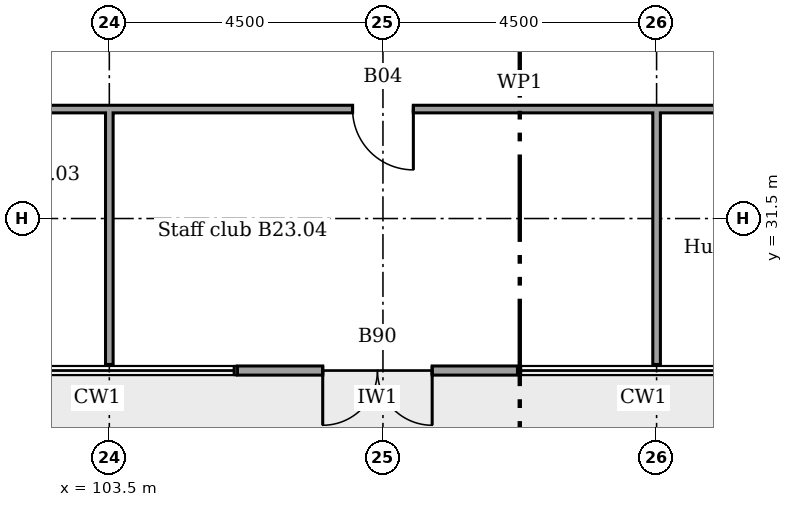
"""IFC4 building model, lengths in metres.
Left out: names, types, materials, properties, quantities, classifications, styles, units other than length and angle.
Written with IfcOpenShell. Run it as: python <this file> out.ifc"""

import sys

from ifc_helpers import new_model, si_unit, direction, frame, frame_2d, origin, place, context, subcontext, project, spatial, rectangle, extrude, element, fill, save


model = new_model("IFC4")
c1 = context("Model", 3, precision=1e-05, world=origin(), true_north=direction((0.0, 1.0)))
c2 = subcontext(c1, "Body", "Model", "MODEL_VIEW")
j1 = project(units=[si_unit("LENGTHUNIT", "METRE"), si_unit("PLANEANGLEUNIT", "RADIAN")], contexts=[c1])
p1 = place(None, origin())
s1 = spatial("IfcSite", under=j1, at=p1, CompositionType="ELEMENT")
p2 = place(p1, origin())
s2 = spatial("IfcBuilding", under=s1, at=p2, CompositionType="ELEMENT")
p3 = place(p2, frame((0.0, 0.0, 95.6)))
s3 = spatial("IfcBuildingStorey", under=s2, at=p3, CompositionType="ELEMENT", Elevation=95.6)
p4 = place(p3, frame((105.606, 29.0, 0.0)))
e1 = element("IfcWall", 1, at=p4, inside=s3, PredefinedType="SOLIDWALL", context=c2, shape_type="SweptSolid", body=[
    extrude(rectangle(XDim=4.606, YDim=0.15, at=frame_2d((2.303, 0.0))), origin(), (0.0, 0.0, 1.0), 3.45),
])
p5 = place(p4, frame((1.403, 0.0, 0.0)))
e2 = element("IfcOpeningElement", 2, at=p5, cuts=e1, PredefinedType="OPENING", context=c2, shape_type="SweptSolid", body=[
    extrude(rectangle(XDim=1.8, YDim=2.4, at=frame_2d((0.9, 1.2))), frame((0.0, 0.085, 0.0), z_axis=(0.0, -1.0, 0.0), x_axis=(1.0, 0.0, 0.0)), (0.0, 0.0, 1.0), 0.17),
])
p6 = place(p3, frame((100.738, 33.3, 0.0)))
e3 = element("IfcWall", 3, at=p6, inside=s3, PredefinedType="PARTITIONING", context=c2, shape_type="SweptSolid", body=[
    extrude(rectangle(XDim=19.025, YDim=0.125, at=frame_2d((9.512, 0.0))), origin(), (0.0, 0.0, 1.0), 3.45),
])
p7 = place(p6, frame((6.762, 0.0, 0.0)))
e4 = element("IfcOpeningElement", 4, at=p7, cuts=e3, PredefinedType="OPENING", context=c2, shape_type="SweptSolid", body=[
    extrude(rectangle(XDim=1.0, YDim=2.1, at=frame_2d((0.5, 1.05))), frame((0.0, 0.073, 0.0), z_axis=(0.0, -1.0, 0.0), x_axis=(1.0, 0.0, 0.0)), (0.0, 0.0, 1.0), 0.145),
])
p8 = place(p6, frame((13.058, 0.0, 0.0)))
e5 = element("IfcOpeningElement", 5, at=p8, cuts=e3, PredefinedType="OPENING", context=c2, shape_type="SweptSolid", body=[
    extrude(rectangle(XDim=1.0, YDim=2.1, at=frame_2d((0.5, 1.05))), frame((0.0, 0.073, 0.0), z_axis=(0.0, -1.0, 0.0), x_axis=(1.0, 0.0, 0.0)), (0.0, 0.0, 1.0), 0.145),
])
for number, where, z_axis, x_axis in (
    (6, (103.5, 29.1, 0.0), (0.0, 0.0, 1.0), (0.0, 1.0, 0.0)),
    (7, (112.5, 29.1, 0.0), (0.0, 0.0, 1.0), (0.0, 1.0, 0.0)),
):
    element("IfcWall", number, at=place(p3, frame(where, z_axis=z_axis, x_axis=x_axis)), inside=s3, PredefinedType="PARTITIONING", context=c2, shape_type="SweptSolid", body=[
        extrude(rectangle(XDim=4.2, YDim=0.125, at=frame_2d((2.1, 0.0))), origin(), (0.0, 0.0, 1.0), 2.851),
    ])
p9 = place(p5, frame((1.8, 0.0, 0.0), x_axis=(-1.0, 0.0, 0.0)))
e8 = element("IfcDoor", 8, at=p9, inside=s3, OperationType="DOUBLE_DOOR_DOUBLE_SWING", PredefinedType="NOTDEFINED", context=c2, shape_type="SweptSolid", body=[
    extrude(rectangle(XDim=1.8, YDim=2.4, at=frame_2d((0.9, 1.2))), frame((0.0, 0.025, 0.0), z_axis=(0.0, -1.0, 0.0), x_axis=(1.0, 0.0, 0.0)), (0.0, 0.0, 1.0), 0.05),
])
fill(e2, e8)
p10 = place(p7, frame((1.0, 0.0, 0.0), x_axis=(-1.0, 0.0, 0.0)))
e9 = element("IfcDoor", 9, at=p10, inside=s3, OperationType="SINGLE_SWING_RIGHT", PredefinedType="DOOR", context=c2, shape_type="SweptSolid", body=[
    extrude(rectangle(XDim=1.0, YDim=2.1, at=frame_2d((0.5, 1.05))), frame((0.0, 0.025, 0.0), z_axis=(0.0, -1.0, 0.0), x_axis=(1.0, 0.0, 0.0)), (0.0, 0.0, 1.0), 0.05),
])
fill(e4, e9)
save(model, sys.argv[1])
